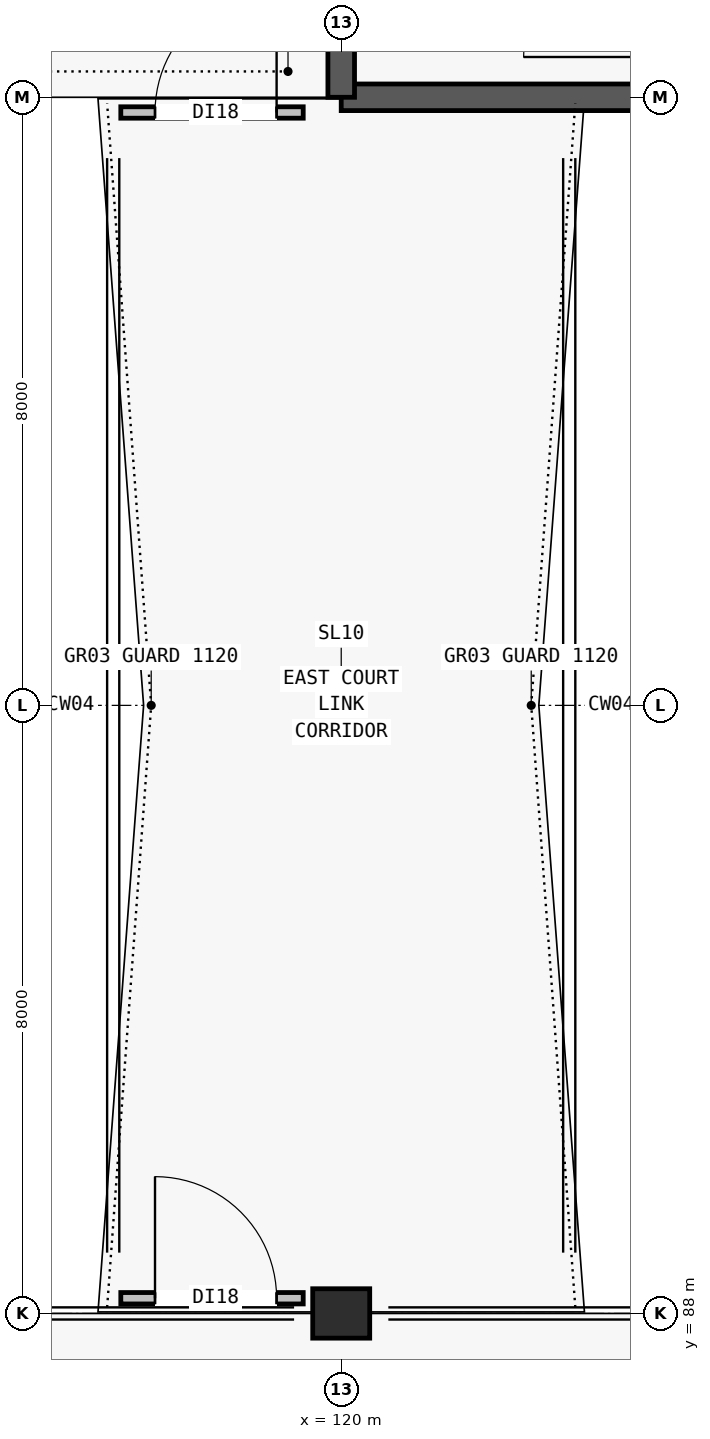
"""IFC4 building model, lengths in metres.
Left out: names, types, materials, properties, quantities, classifications, styles, units other than length and angle.
Written with IfcOpenShell. Run it as: python <this file> out.ifc"""

import sys

from ifc_helpers import new_model, si_unit, direction, frame, frame_2d, origin, origin_2d, place, context, subcontext, project, spatial, rectangle, extrude, element, fill, save


model = new_model("IFC4")
c1 = context("Model", 3, precision=1e-05, world=origin(), true_north=direction((0.0, 1.0)))
c2 = subcontext(c1, "Body", "Model", "MODEL_VIEW")
j1 = project(units=[si_unit("LENGTHUNIT", "METRE"), si_unit("PLANEANGLEUNIT", "RADIAN")], contexts=[c1])
p1 = place(None, origin())
s1 = spatial("IfcSite", under=j1, at=p1, CompositionType="ELEMENT")
p2 = place(p1, origin())
s2 = spatial("IfcBuilding", under=s1, at=p2, CompositionType="ELEMENT")
p3 = place(p2, frame((0.0, 0.0, 5.6)))
s3 = spatial("IfcBuildingStorey", under=s2, at=p3, CompositionType="ELEMENT", Elevation=5.6)
p4 = place(p3, frame((120.0, 88.0, 0.0), z_axis=(0.0, 0.0, 1.0), x_axis=(1.0, 0.0, 0.0)))
e1 = element("IfcColumn", 1, at=p4, inside=s3, PredefinedType="COLUMN", context=c2, shape_type="SweptSolid", body=[
    extrude(rectangle(XDim=0.75, YDim=0.65, at=origin_2d()), origin(), (0.0, 0.0, 1.0), 3.9),
])
for number, where, z_axis, x_axis in (
    (2, (120.0, 104.0, 0.0), (0.0, 0.0, 1.0), (1.0, 0.0, 0.0)),
    (3, (120.0, 113.0, 0.0), (0.0, 0.0, 1.0), (0.0, -1.0, 0.0)),
):
    element("IfcWall", number, at=place(p3, frame(where, z_axis=z_axis, x_axis=x_axis)), inside=s3, PredefinedType="SHEAR", context=c2, shape_type="SweptSolid", body=[
        extrude(rectangle(XDim=9.0, YDim=0.35, at=frame_2d((4.5, 0.0))), origin(), (0.0, 0.0, 1.0), 3.62),
    ])
p5 = place(p3, frame((117.1, 88.2, 0.0), z_axis=(0.0, 0.0, 1.0), x_axis=(1.0, 0.0, 0.0)))
e4 = element("IfcWall", 4, at=p5, inside=s3, PredefinedType="PARTITIONING", context=c2, shape_type="SweptSolid", body=[
    extrude(rectangle(XDim=2.4, YDim=0.15, at=frame_2d((1.2, 0.0))), origin(), (0.0, 0.0, 1.0), 2.48),
])
p6 = place(p5, frame((0.45, 0.0, 0.0)))
e5 = element("IfcOpeningElement", 5, at=p6, cuts=e4, PredefinedType="OPENING", context=c2, shape_type="SweptSolid", body=[
    extrude(rectangle(XDim=1.6, YDim=2.2, at=frame_2d((0.8, 1.1))), frame((0.0, 0.085, 0.0), z_axis=(0.0, -1.0, 0.0), x_axis=(1.0, 0.0, 0.0)), (0.0, 0.0, 1.0), 0.17),
])
p7 = place(p3, frame((117.1, 103.8, 0.0), z_axis=(0.0, 0.0, 1.0), x_axis=(1.0, 0.0, 0.0)))
e6 = element("IfcWall", 6, at=p7, inside=s3, PredefinedType="PARTITIONING", context=c2, shape_type="SweptSolid", body=[
    extrude(rectangle(XDim=2.4, YDim=0.15, at=frame_2d((1.2, 0.0))), origin(), (0.0, 0.0, 1.0), 2.48),
])
p8 = place(p7, frame((0.45, 0.0, 0.0)))
e7 = element("IfcOpeningElement", 7, at=p8, cuts=e6, PredefinedType="OPENING", context=c2, shape_type="SweptSolid", body=[
    extrude(rectangle(XDim=1.6, YDim=2.2, at=frame_2d((0.8, 1.1))), frame((0.0, 0.085, 0.0), z_axis=(0.0, -1.0, 0.0), x_axis=(1.0, 0.0, 0.0)), (0.0, 0.0, 1.0), 0.17),
])
p9 = place(p6, origin())
e8 = element("IfcDoor", 8, at=p9, inside=s3, OperationType="SINGLE_SWING_LEFT", PredefinedType="DOOR", context=c2, shape_type="SweptSolid", body=[
    extrude(rectangle(XDim=1.6, YDim=2.2, at=frame_2d((0.8, 1.1))), frame((0.0, 0.025, 0.0), z_axis=(0.0, -1.0, 0.0), x_axis=(1.0, 0.0, 0.0)), (0.0, 0.0, 1.0), 0.05),
])
fill(e5, e8)
p10 = place(p8, origin())
e9 = element("IfcDoor", 9, at=p10, inside=s3, OperationType="SINGLE_SWING_RIGHT", PredefinedType="DOOR", context=c2, shape_type="SweptSolid", body=[
    extrude(rectangle(XDim=1.6, YDim=2.2, at=frame_2d((0.8, 1.1))), frame((0.0, 0.025, 0.0), z_axis=(0.0, -1.0, 0.0), x_axis=(1.0, 0.0, 0.0)), (0.0, 0.0, 1.0), 0.05),
])
fill(e7, e9)
save(model, sys.argv[1])
